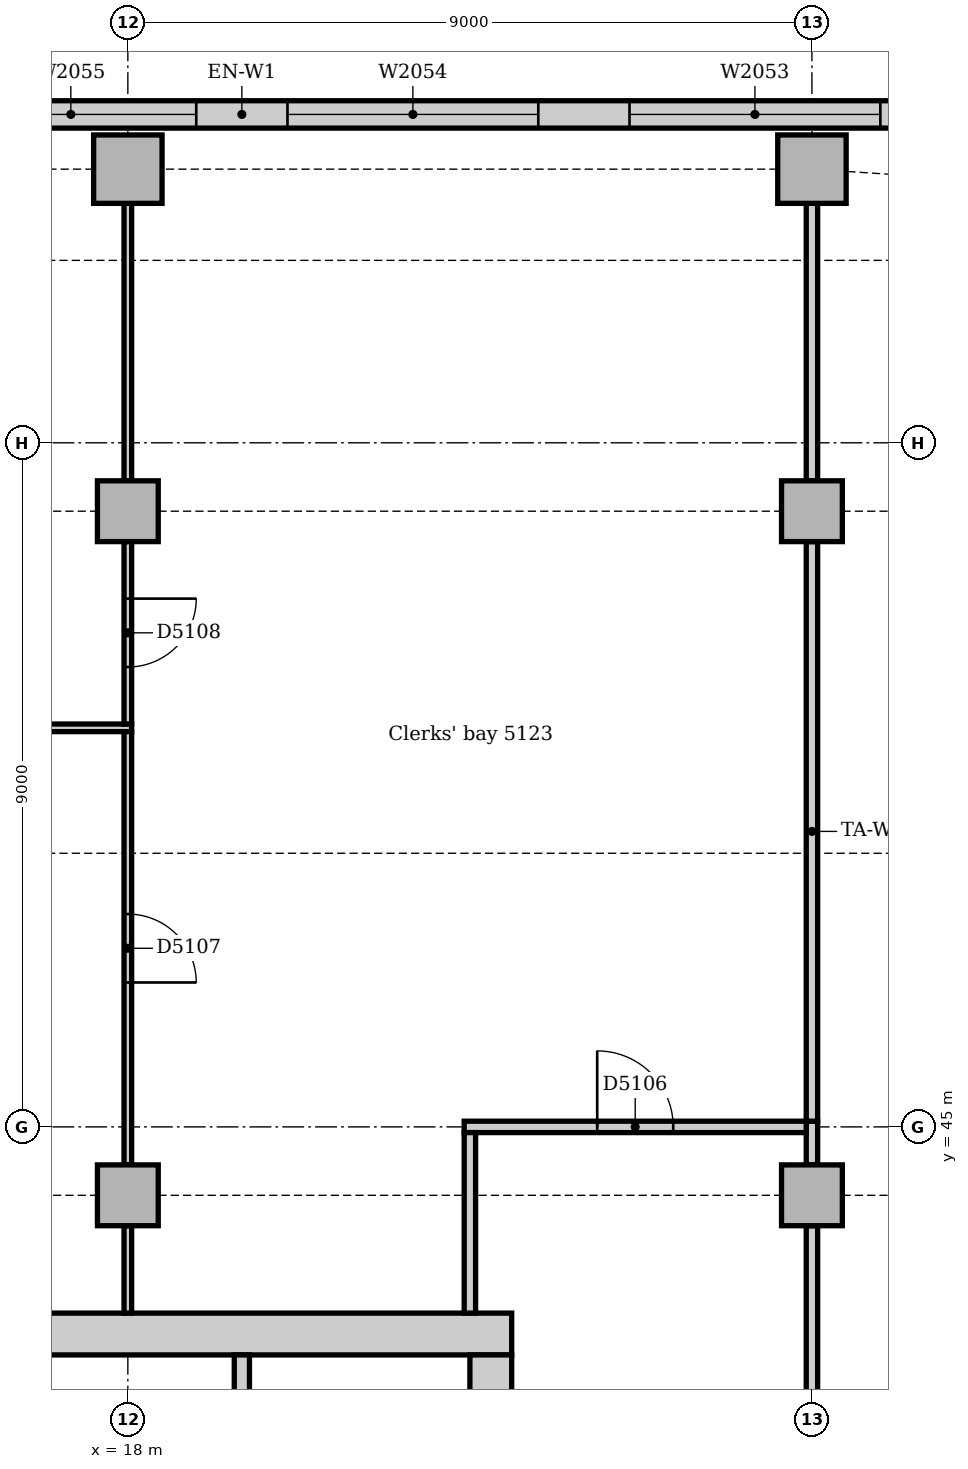
"""IFC4 building model, lengths in metres.
Left out: names, types, materials, properties, quantities, classifications, styles, units other than length and angle.
Written with IfcOpenShell. Run it as: python <this file> out.ifc"""

import sys

from ifc_helpers import new_model, si_unit, direction, frame, frame_2d, origin, origin_2d, place, context, subcontext, project, spatial, rectangle, extrude, element, fill, save


model = new_model("IFC4")
c1 = context("Model", 3, precision=1e-05, world=origin(), true_north=direction((0.0, 1.0)))
c2 = subcontext(c1, "Body", "Model", "MODEL_VIEW")
j1 = project(units=[si_unit("LENGTHUNIT", "METRE"), si_unit("PLANEANGLEUNIT", "RADIAN")], contexts=[c1])
p1 = place(None, origin())
s1 = spatial("IfcSite", under=j1, at=p1, CompositionType="ELEMENT")
p2 = place(p1, origin())
s2 = spatial("IfcBuilding", under=s1, at=p2, CompositionType="ELEMENT")
p3 = place(p2, frame((0.0, 0.0, 214.0)))
s3 = spatial("IfcBuildingStorey", under=s2, at=p3, CompositionType="ELEMENT", Elevation=214.0)
p4 = place(p3, frame((23.05, 42.275, 0.0), z_axis=(0.0, 0.0, 1.0), x_axis=(-1.0, 0.0, 0.0)))
e1 = element("IfcWall", 1, at=p4, inside=s3, PredefinedType="SOLIDWALL", context=c2, shape_type="SweptSolid", body=[
    extrude(rectangle(XDim=19.1, YDim=0.55, at=frame_2d((9.55, 0.0))), origin(), (0.0, 0.0, 1.0), 4.0),
])
p5 = place(p3, frame((22.775, 31.5, 0.0), z_axis=(0.0, 0.0, 1.0), x_axis=(0.0, 1.0, 0.0)))
e2 = element("IfcWall", 2, at=p5, inside=s3, PredefinedType="SOLIDWALL", context=c2, shape_type="SweptSolid", body=[
    extrude(rectangle(XDim=10.5, YDim=0.55, at=frame_2d((5.25, 0.0))), origin(), (0.0, 0.0, 1.0), 4.0),
])
p6 = place(p5, frame((3.15, 0.0, 0.0)))
e3 = element("IfcOpeningElement", 3, at=p6, cuts=e2, PredefinedType="OPENING", context=c2, shape_type="SweptSolid", body=[
    extrude(rectangle(XDim=1.0, YDim=2.1, at=frame_2d((0.5, 1.05))), frame((0.0, 0.285, 0.0), z_axis=(0.0, -1.0, 0.0), x_axis=(1.0, 0.0, 0.0)), (0.0, 0.0, 1.0), 0.57),
])
p7 = place(p5, frame((5.2, 0.0, 0.0)))
e4 = element("IfcOpeningElement", 4, at=p7, cuts=e2, PredefinedType="OPENING", context=c2, shape_type="SweptSolid", body=[
    extrude(rectangle(XDim=1.0, YDim=2.1, at=frame_2d((0.5, 1.05))), frame((0.0, 0.285, 0.0), z_axis=(0.0, -1.0, 0.0), x_axis=(1.0, 0.0, 0.0)), (0.0, 0.0, 1.0), 0.57),
])
for number, where, z_axis, x_axis in (
    (5, (18.0, 57.6, 0.0), (0.0, 0.0, 1.0), (1.0, 0.0, 0.0)),
    (6, (27.0, 57.6, 0.0), (0.0, 0.0, 1.0), (1.0, 0.0, 0.0)),
):
    element("IfcColumn", number, at=place(p3, frame(where, z_axis=z_axis, x_axis=x_axis)), inside=s3, PredefinedType="COLUMN", context=c2, shape_type="SweptSolid", body=[
        extrude(rectangle(XDim=0.9, YDim=0.9, at=origin_2d()), origin(), (0.0, 0.0, 1.0), 3.85),
    ])
for number, where, z_axis, x_axis in (
    (7, (18.0, 44.1, 0.0), (0.0, 0.0, 1.0), (1.0, 0.0, 0.0)),
    (8, (18.0, 53.1, 0.0), (0.0, 0.0, 1.0), (1.0, 0.0, 0.0)),
    (9, (27.0, 44.1, 0.0), (0.0, 0.0, 1.0), (1.0, 0.0, 0.0)),
    (10, (27.0, 53.1, 0.0), (0.0, 0.0, 1.0), (1.0, 0.0, 0.0)),
):
    element("IfcColumn", number, at=place(p3, frame(where, z_axis=z_axis, x_axis=x_axis)), inside=s3, PredefinedType="COLUMN", context=c2, shape_type="SweptSolid", body=[
        extrude(rectangle(XDim=0.8, YDim=0.8, at=origin_2d()), origin(), (0.0, 0.0, 1.0), 3.85),
    ])
p8 = place(p3, frame((34.757, 58.32, 0.0), z_axis=(0.0, 0.0, 1.0), x_axis=(-1.0, 0.0, 0.0)))
e11 = element("IfcWall", 11, at=p8, inside=s3, PredefinedType="STANDARD", context=c2, shape_type="SweptSolid", body=[
    extrude(rectangle(XDim=30.515, YDim=0.36, at=frame_2d((15.257, 0.0))), origin(), (0.0, 0.0, 1.0), 3.85),
])
p9 = place(p8, frame((2.357, 0.0, 0.9)))
e12 = element("IfcOpeningElement", 12, at=p9, cuts=e11, PredefinedType="OPENING", context=c2, shape_type="SweptSolid", body=[
    extrude(rectangle(XDim=3.3, YDim=1.6, at=frame_2d((1.65, 0.8))), frame((0.0, 0.19, 0.0), z_axis=(0.0, -1.0, 0.0), x_axis=(1.0, 0.0, 0.0)), (0.0, 0.0, 1.0), 0.38),
])
p10 = place(p8, frame((6.857, 0.0, 0.9)))
e13 = element("IfcOpeningElement", 13, at=p10, cuts=e11, PredefinedType="OPENING", context=c2, shape_type="SweptSolid", body=[
    extrude(rectangle(XDim=3.3, YDim=1.6, at=frame_2d((1.65, 0.8))), frame((0.0, 0.19, 0.0), z_axis=(0.0, -1.0, 0.0), x_axis=(1.0, 0.0, 0.0)), (0.0, 0.0, 1.0), 0.38),
])
p11 = place(p8, frame((11.357, 0.0, 0.9)))
e14 = element("IfcOpeningElement", 14, at=p11, cuts=e11, PredefinedType="OPENING", context=c2, shape_type="SweptSolid", body=[
    extrude(rectangle(XDim=3.3, YDim=1.6, at=frame_2d((1.65, 0.8))), frame((0.0, 0.19, 0.0), z_axis=(0.0, -1.0, 0.0), x_axis=(1.0, 0.0, 0.0)), (0.0, 0.0, 1.0), 0.38),
])
p12 = place(p8, frame((15.857, 0.0, 0.9)))
e15 = element("IfcOpeningElement", 15, at=p12, cuts=e11, PredefinedType="OPENING", context=c2, shape_type="SweptSolid", body=[
    extrude(rectangle(XDim=3.3, YDim=1.6, at=frame_2d((1.65, 0.8))), frame((0.0, 0.19, 0.0), z_axis=(0.0, -1.0, 0.0), x_axis=(1.0, 0.0, 0.0)), (0.0, 0.0, 1.0), 0.38),
])
p13 = place(p8, frame((20.357, 0.0, 0.9)))
e16 = element("IfcOpeningElement", 16, at=p13, cuts=e11, PredefinedType="OPENING", context=c2, shape_type="SweptSolid", body=[
    extrude(rectangle(XDim=3.3, YDim=1.6, at=frame_2d((1.65, 0.8))), frame((0.0, 0.19, 0.0), z_axis=(0.0, -1.0, 0.0), x_axis=(1.0, 0.0, 0.0)), (0.0, 0.0, 1.0), 0.38),
])
p14 = place(p8, frame((24.857, 0.0, 0.9)))
e17 = element("IfcOpeningElement", 17, at=p14, cuts=e11, PredefinedType="OPENING", context=c2, shape_type="SweptSolid", body=[
    extrude(rectangle(XDim=3.3, YDim=1.6, at=frame_2d((1.65, 0.8))), frame((0.0, 0.19, 0.0), z_axis=(0.0, -1.0, 0.0), x_axis=(1.0, 0.0, 0.0)), (0.0, 0.0, 1.0), 0.38),
])
p15 = place(p3, frame((19.5, 38.6, 0.0), z_axis=(0.0, 0.0, 1.0), x_axis=(0.0, 1.0, 0.0)))
e18 = element("IfcWall", 18, at=p15, inside=s3, PredefinedType="PARTITIONING", context=c2, shape_type="SweptSolid", body=[
    extrude(rectangle(XDim=3.4, YDim=0.2, at=frame_2d((1.7, 0.0))), origin(), (0.0, 0.0, 1.0), 3.85),
])
p16 = place(p3, frame((27.0, 36.4, 0.0), z_axis=(0.0, 0.0, 1.0), x_axis=(0.0, 1.0, 0.0)))
e19 = element("IfcWall", 19, at=p16, inside=s3, PredefinedType="PARTITIONING", context=c2, shape_type="SweptSolid", body=[
    extrude(rectangle(XDim=7.3, YDim=0.15, at=frame_2d((3.65, 0.0))), origin(), (0.0, 0.0, 1.0), 3.35),
])
p17 = place(p3, frame((27.0, 44.5, 0.0), z_axis=(0.0, 0.0, 1.0), x_axis=(0.0, 1.0, 0.0)))
e20 = element("IfcWall", 20, at=p17, inside=s3, PredefinedType="PARTITIONING", context=c2, shape_type="SweptSolid", body=[
    extrude(rectangle(XDim=0.575, YDim=0.15, at=frame_2d((0.287, 0.0))), origin(), (0.0, 0.0, 1.0), 3.35),
])
p18 = place(p3, frame((22.425, 45.0, 0.0), z_axis=(0.0, 0.0, 1.0), x_axis=(1.0, 0.0, 0.0)))
e21 = element("IfcWall", 21, at=p18, inside=s3, PredefinedType="PARTITIONING", context=c2, shape_type="SweptSolid", body=[
    extrude(rectangle(XDim=4.5, YDim=0.15, at=frame_2d((2.25, 0.0))), origin(), (0.0, 0.0, 1.0), 3.85),
])
p19 = place(p18, frame((1.75, 0.0, 0.0)))
e22 = element("IfcOpeningElement", 22, at=p19, cuts=e21, PredefinedType="OPENING", context=c2, shape_type="SweptSolid", body=[
    extrude(rectangle(XDim=1.0, YDim=2.1, at=frame_2d((0.5, 1.05))), frame((0.0, 0.085, 0.0), z_axis=(0.0, -1.0, 0.0), x_axis=(1.0, 0.0, 0.0)), (0.0, 0.0, 1.0), 0.17),
])
p20 = place(p3, frame((22.5, 42.55, 0.0), z_axis=(0.0, 0.0, 1.0), x_axis=(0.0, 1.0, 0.0)))
e23 = element("IfcWall", 23, at=p20, inside=s3, PredefinedType="PARTITIONING", context=c2, shape_type="SweptSolid", body=[
    extrude(rectangle(XDim=2.375, YDim=0.15, at=frame_2d((1.188, 0.0))), origin(), (0.0, 0.0, 1.0), 3.85),
])
p21 = place(p3, frame((27.0, 45.075, 0.0), z_axis=(0.0, 0.0, 1.0), x_axis=(0.0, 1.0, 0.0)))
e24 = element("IfcWall", 24, at=p21, inside=s3, PredefinedType="PARTITIONING", context=c2, shape_type="SweptSolid", body=[
    extrude(rectangle(XDim=7.625, YDim=0.15, at=frame_2d((3.812, 0.0))), origin(), (0.0, 0.0, 1.0), 3.35),
])
p22 = place(p3, frame((27.0, 53.5, 0.0), z_axis=(0.0, 0.0, 1.0), x_axis=(0.0, 1.0, 0.0)))
e25 = element("IfcWall", 25, at=p22, inside=s3, PredefinedType="PARTITIONING", context=c2, shape_type="SweptSolid", body=[
    extrude(rectangle(XDim=3.65, YDim=0.15, at=frame_2d((1.825, 0.0))), origin(), (0.0, 0.0, 1.0), 3.41),
])
p23 = place(p3, frame((0.36, 50.25, 0.0), z_axis=(0.0, 0.0, 1.0), x_axis=(1.0, 0.0, 0.0)))
e26 = element("IfcWall", 26, at=p23, inside=s3, PredefinedType="PARTITIONING", context=c2, shape_type="SweptSolid", body=[
    extrude(rectangle(XDim=17.69, YDim=0.1, at=frame_2d((8.845, 0.0))), origin(), (0.0, 0.0, 1.0), 3.85),
])
p24 = place(p3, frame((18.0, 42.55, 0.0), z_axis=(0.0, 0.0, 1.0), x_axis=(0.0, 1.0, 0.0)))
e27 = element("IfcWall", 27, at=p24, inside=s3, PredefinedType="PARTITIONING", context=c2, shape_type="SweptSolid", body=[
    extrude(rectangle(XDim=1.15, YDim=0.1, at=frame_2d((0.575, 0.0))), origin(), (0.0, 0.0, 1.0), 3.652),
])
p25 = place(p3, frame((18.0, 50.3, 0.0), z_axis=(0.0, 0.0, 1.0), x_axis=(0.0, 1.0, 0.0)))
e28 = element("IfcWall", 28, at=p25, inside=s3, PredefinedType="PARTITIONING", context=c2, shape_type="SweptSolid", body=[
    extrude(rectangle(XDim=2.4, YDim=0.1, at=frame_2d((1.2, 0.0))), origin(), (0.0, 0.0, 1.0), 3.35),
])
p26 = place(p25, frame((0.75, 0.0, 0.0)))
e29 = element("IfcOpeningElement", 29, at=p26, cuts=e28, PredefinedType="OPENING", context=c2, shape_type="SweptSolid", body=[
    extrude(rectangle(XDim=0.9, YDim=2.1, at=frame_2d((0.45, 1.05))), frame((0.0, 0.06, 0.0), z_axis=(0.0, -1.0, 0.0), x_axis=(1.0, 0.0, 0.0)), (0.0, 0.0, 1.0), 0.12),
])
p27 = place(p3, frame((18.0, 44.5, 0.0), z_axis=(0.0, 0.0, 1.0), x_axis=(0.0, 1.0, 0.0)))
e30 = element("IfcWall", 30, at=p27, inside=s3, PredefinedType="PARTITIONING", context=c2, shape_type="SweptSolid", body=[
    extrude(rectangle(XDim=5.7, YDim=0.1, at=frame_2d((2.85, 0.0))), origin(), (0.0, 0.0, 1.0), 3.35),
])
p28 = place(p27, frame((2.4, 0.0, 0.0)))
e31 = element("IfcOpeningElement", 31, at=p28, cuts=e30, PredefinedType="OPENING", context=c2, shape_type="SweptSolid", body=[
    extrude(rectangle(XDim=0.9, YDim=2.1, at=frame_2d((0.45, 1.05))), frame((0.0, 0.06, 0.0), z_axis=(0.0, -1.0, 0.0), x_axis=(1.0, 0.0, 0.0)), (0.0, 0.0, 1.0), 0.12),
])
p29 = place(p3, frame((18.0, 53.5, 0.0), z_axis=(0.0, 0.0, 1.0), x_axis=(0.0, 1.0, 0.0)))
e32 = element("IfcWall", 32, at=p29, inside=s3, PredefinedType="PARTITIONING", context=c2, shape_type="SweptSolid", body=[
    extrude(rectangle(XDim=3.65, YDim=0.1, at=frame_2d((1.825, 0.0))), origin(), (0.0, 0.0, 1.0), 3.41),
])
p30 = place(p10, origin())
e33 = element("IfcWindow", 33, at=p30, inside=s3, PartitioningType="SINGLE_PANEL", PredefinedType="WINDOW", context=c2, shape_type="SweptSolid", body=[
    extrude(rectangle(XDim=3.3, YDim=1.6, at=frame_2d((1.65, 0.8))), frame((0.0, 0.13, 0.0), z_axis=(0.0, -1.0, 0.0), x_axis=(1.0, 0.0, 0.0)), (0.0, 0.0, 1.0), 0.06),
])
fill(e13, e33)
p31 = place(p11, origin())
e34 = element("IfcWindow", 34, at=p31, inside=s3, PartitioningType="SINGLE_PANEL", PredefinedType="WINDOW", context=c2, shape_type="SweptSolid", body=[
    extrude(rectangle(XDim=3.3, YDim=1.6, at=frame_2d((1.65, 0.8))), frame((0.0, 0.13, 0.0), z_axis=(0.0, -1.0, 0.0), x_axis=(1.0, 0.0, 0.0)), (0.0, 0.0, 1.0), 0.06),
])
fill(e14, e34)
p32 = place(p12, origin())
e35 = element("IfcWindow", 35, at=p32, inside=s3, PartitioningType="SINGLE_PANEL", PredefinedType="WINDOW", context=c2, shape_type="SweptSolid", body=[
    extrude(rectangle(XDim=3.3, YDim=1.6, at=frame_2d((1.65, 0.8))), frame((0.0, 0.13, 0.0), z_axis=(0.0, -1.0, 0.0), x_axis=(1.0, 0.0, 0.0)), (0.0, 0.0, 1.0), 0.06),
])
fill(e15, e35)
p33 = place(p19, origin())
e36 = element("IfcDoor", 36, at=p33, inside=s3, OperationType="SINGLE_SWING_LEFT", PredefinedType="DOOR", context=c2, shape_type="SweptSolid", body=[
    extrude(rectangle(XDim=1.0, YDim=2.1, at=frame_2d((0.5, 1.05))), frame((0.0, 0.025, 0.0), z_axis=(0.0, -1.0, 0.0), x_axis=(1.0, 0.0, 0.0)), (0.0, 0.0, 1.0), 0.05),
])
fill(e22, e36)
p34 = place(p28, frame((0.9, 0.0, 0.0), z_axis=(0.0, 0.0, 1.0), x_axis=(-1.0, 0.0, 0.0)))
e37 = element("IfcDoor", 37, at=p34, inside=s3, OperationType="SINGLE_SWING_RIGHT", PredefinedType="DOOR", context=c2, shape_type="SweptSolid", body=[
    extrude(rectangle(XDim=0.9, YDim=2.1, at=frame_2d((0.45, 1.05))), frame((0.0, 0.025, 0.0), z_axis=(0.0, -1.0, 0.0), x_axis=(1.0, 0.0, 0.0)), (0.0, 0.0, 1.0), 0.05),
])
fill(e31, e37)
p35 = place(p26, frame((0.9, 0.0, 0.0), z_axis=(0.0, 0.0, 1.0), x_axis=(-1.0, 0.0, 0.0)))
e38 = element("IfcDoor", 38, at=p35, inside=s3, OperationType="SINGLE_SWING_LEFT", PredefinedType="DOOR", context=c2, shape_type="SweptSolid", body=[
    extrude(rectangle(XDim=0.9, YDim=2.1, at=frame_2d((0.45, 1.05))), frame((0.0, 0.025, 0.0), z_axis=(0.0, -1.0, 0.0), x_axis=(1.0, 0.0, 0.0)), (0.0, 0.0, 1.0), 0.05),
])
fill(e29, e38)
save(model, sys.argv[1])
